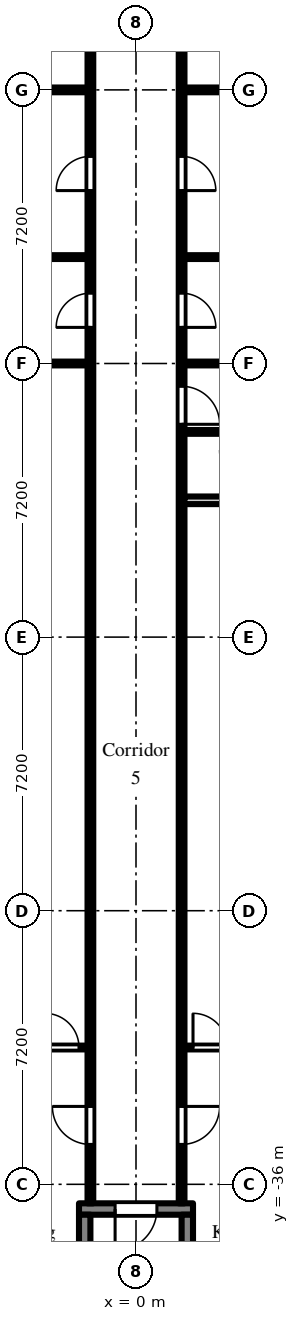
"""IFC4 building model, lengths in metres.
Left out: names, types, materials, properties, quantities, classifications, styles, units other than length and angle.
Written with IfcOpenShell. Run it as: python <this file> out.ifc"""

import sys

from ifc_helpers import new_model, si_unit, direction, frame, frame_2d, origin, place, context, subcontext, project, spatial, rectangle, extrude, element, fill, save


model = new_model("IFC4")
c1 = context("Model", 3, precision=1e-05, world=origin(), true_north=direction((0.0, 1.0)))
c2 = subcontext(c1, "Body", "Model", "MODEL_VIEW")
j1 = project(units=[si_unit("LENGTHUNIT", "METRE"), si_unit("PLANEANGLEUNIT", "RADIAN")], contexts=[c1])
p1 = place(None, origin())
s1 = spatial("IfcSite", under=j1, at=p1, CompositionType="ELEMENT")
p2 = place(p1, origin())
s2 = spatial("IfcBuilding", under=s1, at=p2, CompositionType="ELEMENT")
p3 = place(p2, frame((0.0, 0.0, 69.9)))
s3 = spatial("IfcBuildingStorey", under=s2, at=p3, CompositionType="ELEMENT", Elevation=69.9)
p4 = place(p3, frame((-1.5, -36.65, 0.0), z_axis=(0.0, 0.0, 1.0), x_axis=(1.0, 0.0, 0.0)))
e1 = element("IfcWall", 1, at=p4, inside=s3, PredefinedType="SHEAR", context=c2, shape_type="SweptSolid", body=[
    extrude(rectangle(XDim=3.0, YDim=0.3, at=frame_2d((1.5, 0.0))), origin(), (0.0, 0.0, 1.0), 2.575),
])
p5 = place(p4, frame((0.95, 0.0, 0.0)))
e2 = element("IfcOpeningElement", 2, at=p5, cuts=e1, PredefinedType="OPENING", context=c2, shape_type="SweptSolid", body=[
    extrude(rectangle(XDim=1.1, YDim=2.1, at=frame_2d((0.55, 1.05))), frame((0.0, 0.16, 0.0), z_axis=(0.0, -1.0, 0.0), x_axis=(1.0, 0.0, 0.0)), (0.0, 0.0, 1.0), 0.32),
])
for number, where, z_axis, x_axis in (
    (3, (-1.35, -36.8, 0.0), (0.0, 0.0, 1.0), (0.0, -1.0, 0.0)),
    (4, (1.35, -36.8, 0.0), (0.0, 0.0, 1.0), (0.0, -1.0, 0.0)),
):
    element("IfcWall", number, at=place(p3, frame(where, z_axis=z_axis, x_axis=x_axis)), inside=s3, PredefinedType="SHEAR", context=c2, shape_type="SweptSolid", body=[
        extrude(rectangle(XDim=5.8, YDim=0.3, at=frame_2d((2.9, 0.0))), origin(), (0.0, 0.0, 1.0), 2.575),
    ])
p6 = place(p3, frame((-6.9, -32.4, 0.0), z_axis=(0.0, 0.0, 1.0), x_axis=(1.0, 0.0, 0.0)))
e5 = element("IfcWall", 5, at=p6, inside=s3, PredefinedType="PARTITIONING", context=c2, shape_type="SweptSolid", body=[
    extrude(rectangle(XDim=5.625, YDim=0.1, at=frame_2d((2.812, 0.0))), origin(), (0.0, 0.0, 1.0), 2.575),
])
p7 = place(p6, frame((4.5, 0.0, 0.0)))
e6 = element("IfcOpeningElement", 6, at=p7, cuts=e5, PredefinedType="OPENING", context=c2, shape_type="SweptSolid", body=[
    extrude(rectangle(XDim=0.9, YDim=2.1, at=frame_2d((0.45, 1.05))), frame((0.0, 0.06, 0.0), z_axis=(0.0, -1.0, 0.0), x_axis=(1.0, 0.0, 0.0)), (0.0, 0.0, 1.0), 0.12),
])
p8 = place(p3, frame((-3.9, -11.6, 0.0), z_axis=(0.0, 0.0, 1.0), x_axis=(1.0, 0.0, 0.0)))
e7 = element("IfcWall", 7, at=p8, inside=s3, PredefinedType="PARTITIONING", context=c2, shape_type="SweptSolid", body=[
    extrude(rectangle(XDim=2.625, YDim=0.1, at=frame_2d((1.312, 0.0))), origin(), (0.0, 0.0, 1.0), 2.575),
])
p9 = place(p3, frame((-3.9, -7.2, 0.0), z_axis=(0.0, 0.0, 1.0), x_axis=(1.0, 0.0, 0.0)))
e8 = element("IfcWall", 8, at=p9, inside=s3, PredefinedType="PARTITIONING", context=c2, shape_type="SweptSolid", body=[
    extrude(rectangle(XDim=2.625, YDim=0.125, at=frame_2d((1.312, 0.0))), origin(), (0.0, 0.0, 1.0), 2.575),
])
p10 = place(p3, frame((-2.7, -14.4, 0.0), z_axis=(0.0, 0.0, 1.0), x_axis=(1.0, 0.0, 0.0)))
e9 = element("IfcWall", 9, at=p10, inside=s3, PredefinedType="PARTITIONING", context=c2, shape_type="SweptSolid", body=[
    extrude(rectangle(XDim=1.425, YDim=0.1, at=frame_2d((0.712, 0.0))), origin(), (0.0, 0.0, 1.0), 2.575),
])
p11 = place(p3, frame((-1.2, -36.5, 0.0), z_axis=(0.0, 0.0, 1.0), x_axis=(0.0, 1.0, 0.0)))
e10 = element("IfcWall", 10, at=p11, inside=s3, PredefinedType="PARTITIONING", context=c2, shape_type="SweptSolid", body=[
    extrude(rectangle(XDim=35.225, YDim=0.15, at=frame_2d((17.613, 0.0))), origin(), (0.0, 0.0, 1.0), 2.575),
])
p12 = place(p11, frame((31.85, 0.0, 0.0)))
e11 = element("IfcOpeningElement", 11, at=p12, cuts=e10, PredefinedType="OPENING", context=c2, shape_type="SweptSolid", body=[
    extrude(rectangle(XDim=0.9, YDim=2.1, at=frame_2d((0.45, 1.05))), frame((0.0, 0.085, 0.0), z_axis=(0.0, -1.0, 0.0), x_axis=(1.0, 0.0, 0.0)), (0.0, 0.0, 1.0), 0.17),
])
p13 = place(p11, frame((23.05, 0.0, 0.0)))
e12 = element("IfcOpeningElement", 12, at=p13, cuts=e10, PredefinedType="OPENING", context=c2, shape_type="SweptSolid", body=[
    extrude(rectangle(XDim=0.9, YDim=2.1, at=frame_2d((0.45, 1.05))), frame((0.0, 0.085, 0.0), z_axis=(0.0, -1.0, 0.0), x_axis=(1.0, 0.0, 0.0)), (0.0, 0.0, 1.0), 0.17),
])
p14 = place(p11, frame((26.65, 0.0, 0.0)))
e13 = element("IfcOpeningElement", 13, at=p14, cuts=e10, PredefinedType="OPENING", context=c2, shape_type="SweptSolid", body=[
    extrude(rectangle(XDim=0.9, YDim=2.1, at=frame_2d((0.45, 1.05))), frame((0.0, 0.085, 0.0), z_axis=(0.0, -1.0, 0.0), x_axis=(1.0, 0.0, 0.0)), (0.0, 0.0, 1.0), 0.17),
])
p15 = place(p11, frame((1.55, 0.0, 0.0)))
e14 = element("IfcOpeningElement", 14, at=p15, cuts=e10, PredefinedType="OPENING", context=c2, shape_type="SweptSolid", body=[
    extrude(rectangle(XDim=1.0, YDim=2.1, at=frame_2d((0.5, 1.05))), frame((0.0, 0.085, 0.0), z_axis=(0.0, -1.0, 0.0), x_axis=(1.0, 0.0, 0.0)), (0.0, 0.0, 1.0), 0.17),
])
p16 = place(p3, frame((1.2, -36.5, 0.0), z_axis=(0.0, 0.0, 1.0), x_axis=(0.0, 1.0, 0.0)))
e15 = element("IfcWall", 15, at=p16, inside=s3, PredefinedType="PARTITIONING", context=c2, shape_type="SweptSolid", body=[
    extrude(rectangle(XDim=35.375, YDim=0.15, at=frame_2d((17.688, 0.0))), origin(), (0.0, 0.0, 1.0), 2.575),
])
p17 = place(p16, frame((31.85, 0.0, 0.0)))
e16 = element("IfcOpeningElement", 16, at=p17, cuts=e15, PredefinedType="OPENING", context=c2, shape_type="SweptSolid", body=[
    extrude(rectangle(XDim=0.9, YDim=2.1, at=frame_2d((0.45, 1.05))), frame((0.0, 0.085, 0.0), z_axis=(0.0, -1.0, 0.0), x_axis=(1.0, 0.0, 0.0)), (0.0, 0.0, 1.0), 0.17),
])
p18 = place(p16, frame((23.05, 0.0, 0.0)))
e17 = element("IfcOpeningElement", 17, at=p18, cuts=e15, PredefinedType="OPENING", context=c2, shape_type="SweptSolid", body=[
    extrude(rectangle(XDim=0.9, YDim=2.1, at=frame_2d((0.45, 1.05))), frame((0.0, 0.085, 0.0), z_axis=(0.0, -1.0, 0.0), x_axis=(1.0, 0.0, 0.0)), (0.0, 0.0, 1.0), 0.17),
])
p19 = place(p16, frame((26.65, 0.0, 0.0)))
e18 = element("IfcOpeningElement", 18, at=p19, cuts=e15, PredefinedType="OPENING", context=c2, shape_type="SweptSolid", body=[
    extrude(rectangle(XDim=0.9, YDim=2.1, at=frame_2d((0.45, 1.05))), frame((0.0, 0.085, 0.0), z_axis=(0.0, -1.0, 0.0), x_axis=(1.0, 0.0, 0.0)), (0.0, 0.0, 1.0), 0.17),
])
p20 = place(p16, frame((20.5, 0.0, 0.0)))
e19 = element("IfcOpeningElement", 19, at=p20, cuts=e15, PredefinedType="OPENING", context=c2, shape_type="SweptSolid", body=[
    extrude(rectangle(XDim=1.0, YDim=2.1, at=frame_2d((0.5, 1.05))), frame((0.0, 0.085, 0.0), z_axis=(0.0, -1.0, 0.0), x_axis=(1.0, 0.0, 0.0)), (0.0, 0.0, 1.0), 0.17),
])
p21 = place(p16, frame((1.55, 0.0, 0.0)))
e20 = element("IfcOpeningElement", 20, at=p21, cuts=e15, PredefinedType="OPENING", context=c2, shape_type="SweptSolid", body=[
    extrude(rectangle(XDim=1.0, YDim=2.1, at=frame_2d((0.5, 1.05))), frame((0.0, 0.085, 0.0), z_axis=(0.0, -1.0, 0.0), x_axis=(1.0, 0.0, 0.0)), (0.0, 0.0, 1.0), 0.17),
])
p22 = place(p3, frame((1.275, -32.4, 0.0), z_axis=(0.0, 0.0, 1.0), x_axis=(1.0, 0.0, 0.0)))
e21 = element("IfcWall", 21, at=p22, inside=s3, PredefinedType="PARTITIONING", context=c2, shape_type="SweptSolid", body=[
    extrude(rectangle(XDim=5.625, YDim=0.1, at=frame_2d((2.812, 0.0))), origin(), (0.0, 0.0, 1.0), 2.575),
])
p23 = place(p22, frame((0.225, 0.0, 0.0)))
e22 = element("IfcOpeningElement", 22, at=p23, cuts=e21, PredefinedType="OPENING", context=c2, shape_type="SweptSolid", body=[
    extrude(rectangle(XDim=0.9, YDim=2.1, at=frame_2d((0.45, 1.05))), frame((0.0, 0.06, 0.0), z_axis=(0.0, -1.0, 0.0), x_axis=(1.0, 0.0, 0.0)), (0.0, 0.0, 1.0), 0.12),
])
p24 = place(p3, frame((1.275, -18.0, 0.0), z_axis=(0.0, 0.0, 1.0), x_axis=(1.0, 0.0, 0.0)))
e23 = element("IfcWall", 23, at=p24, inside=s3, PredefinedType="PARTITIONING", context=c2, shape_type="SweptSolid", body=[
    extrude(rectangle(XDim=1.475, YDim=0.2, at=frame_2d((0.738, 0.0))), origin(), (0.0, 0.0, 1.0), 2.575),
])
p25 = place(p3, frame((1.275, -16.2, 0.0), z_axis=(0.0, 0.0, 1.0), x_axis=(1.0, 0.0, 0.0)))
e24 = element("IfcWall", 24, at=p25, inside=s3, PredefinedType="PARTITIONING", context=c2, shape_type="SweptSolid", body=[
    extrude(rectangle(XDim=1.775, YDim=0.1, at=frame_2d((0.888, 0.0))), origin(), (0.0, 0.0, 1.0), 2.575),
])
for number, where, z_axis, x_axis in (
    (25, (1.275, -14.4, 0.0), (0.0, 0.0, 1.0), (1.0, 0.0, 0.0)),
    (26, (1.275, -11.6, 0.0), (0.0, 0.0, 1.0), (1.0, 0.0, 0.0)),
):
    element("IfcWall", number, at=place(p3, frame(where, z_axis=z_axis, x_axis=x_axis)), inside=s3, PredefinedType="PARTITIONING", context=c2, shape_type="SweptSolid", body=[
        extrude(rectangle(XDim=2.625, YDim=0.1, at=frame_2d((1.312, 0.0))), origin(), (0.0, 0.0, 1.0), 2.575),
    ])
p26 = place(p3, frame((1.275, -7.2, 0.0), z_axis=(0.0, 0.0, 1.0), x_axis=(1.0, 0.0, 0.0)))
e27 = element("IfcWall", 27, at=p26, inside=s3, PredefinedType="PARTITIONING", context=c2, shape_type="SweptSolid", body=[
    extrude(rectangle(XDim=2.625, YDim=0.125, at=frame_2d((1.312, 0.0))), origin(), (0.0, 0.0, 1.0), 2.575),
])
p27 = place(p5, frame((1.1, 0.0, 0.0), z_axis=(0.0, 0.0, 1.0), x_axis=(-1.0, 0.0, 0.0)))
e28 = element("IfcDoor", 28, at=p27, inside=s3, OperationType="SINGLE_SWING_RIGHT", PredefinedType="DOOR", context=c2, shape_type="SweptSolid", body=[
    extrude(rectangle(XDim=1.1, YDim=2.1, at=frame_2d((0.55, 1.05))), frame((0.0, 0.025, 0.0), z_axis=(0.0, -1.0, 0.0), x_axis=(1.0, 0.0, 0.0)), (0.0, 0.0, 1.0), 0.05),
])
fill(e2, e28)
p28 = place(p18, frame((0.9, 0.0, 0.0), z_axis=(0.0, 0.0, 1.0), x_axis=(-1.0, 0.0, 0.0)))
e29 = element("IfcDoor", 29, at=p28, inside=s3, OperationType="SINGLE_SWING_RIGHT", PredefinedType="DOOR", context=c2, shape_type="SweptSolid", body=[
    extrude(rectangle(XDim=0.9, YDim=2.1, at=frame_2d((0.45, 1.05))), frame((0.0, 0.025, 0.0), z_axis=(0.0, -1.0, 0.0), x_axis=(1.0, 0.0, 0.0)), (0.0, 0.0, 1.0), 0.05),
])
fill(e17, e29)
p29 = place(p19, frame((0.9, 0.0, 0.0), z_axis=(0.0, 0.0, 1.0), x_axis=(-1.0, 0.0, 0.0)))
e30 = element("IfcDoor", 30, at=p29, inside=s3, OperationType="SINGLE_SWING_RIGHT", PredefinedType="DOOR", context=c2, shape_type="SweptSolid", body=[
    extrude(rectangle(XDim=0.9, YDim=2.1, at=frame_2d((0.45, 1.05))), frame((0.0, 0.025, 0.0), z_axis=(0.0, -1.0, 0.0), x_axis=(1.0, 0.0, 0.0)), (0.0, 0.0, 1.0), 0.05),
])
fill(e18, e30)
p30 = place(p20, frame((1.0, 0.0, 0.0), z_axis=(0.0, 0.0, 1.0), x_axis=(-1.0, 0.0, 0.0)))
e31 = element("IfcDoor", 31, at=p30, inside=s3, OperationType="SINGLE_SWING_RIGHT", PredefinedType="DOOR", context=c2, shape_type="SweptSolid", body=[
    extrude(rectangle(XDim=1.0, YDim=2.1, at=frame_2d((0.5, 1.05))), frame((0.0, 0.025, 0.0), z_axis=(0.0, -1.0, 0.0), x_axis=(1.0, 0.0, 0.0)), (0.0, 0.0, 1.0), 0.05),
])
fill(e19, e31)
p31 = place(p21, frame((1.0, 0.0, 0.0), z_axis=(0.0, 0.0, 1.0), x_axis=(-1.0, 0.0, 0.0)))
e32 = element("IfcDoor", 32, at=p31, inside=s3, OperationType="SINGLE_SWING_LEFT", PredefinedType="DOOR", context=c2, shape_type="SweptSolid", body=[
    extrude(rectangle(XDim=1.0, YDim=2.1, at=frame_2d((0.5, 1.05))), frame((0.0, 0.025, 0.0), z_axis=(0.0, -1.0, 0.0), x_axis=(1.0, 0.0, 0.0)), (0.0, 0.0, 1.0), 0.05),
])
fill(e20, e32)
p32 = place(p23, origin())
e33 = element("IfcDoor", 33, at=p32, inside=s3, OperationType="SINGLE_SWING_LEFT", PredefinedType="DOOR", context=c2, shape_type="SweptSolid", body=[
    extrude(rectangle(XDim=0.9, YDim=2.1, at=frame_2d((0.45, 1.05))), frame((0.0, 0.025, 0.0), z_axis=(0.0, -1.0, 0.0), x_axis=(1.0, 0.0, 0.0)), (0.0, 0.0, 1.0), 0.05),
])
fill(e22, e33)
p33 = place(p13, origin())
e34 = element("IfcDoor", 34, at=p33, inside=s3, OperationType="SINGLE_SWING_LEFT", PredefinedType="DOOR", context=c2, shape_type="SweptSolid", body=[
    extrude(rectangle(XDim=0.9, YDim=2.1, at=frame_2d((0.45, 1.05))), frame((0.0, 0.025, 0.0), z_axis=(0.0, -1.0, 0.0), x_axis=(1.0, 0.0, 0.0)), (0.0, 0.0, 1.0), 0.05),
])
fill(e12, e34)
p34 = place(p14, origin())
e35 = element("IfcDoor", 35, at=p34, inside=s3, OperationType="SINGLE_SWING_LEFT", PredefinedType="DOOR", context=c2, shape_type="SweptSolid", body=[
    extrude(rectangle(XDim=0.9, YDim=2.1, at=frame_2d((0.45, 1.05))), frame((0.0, 0.025, 0.0), z_axis=(0.0, -1.0, 0.0), x_axis=(1.0, 0.0, 0.0)), (0.0, 0.0, 1.0), 0.05),
])
fill(e13, e35)
p35 = place(p15, origin())
e36 = element("IfcDoor", 36, at=p35, inside=s3, OperationType="SINGLE_SWING_RIGHT", PredefinedType="DOOR", context=c2, shape_type="SweptSolid", body=[
    extrude(rectangle(XDim=1.0, YDim=2.1, at=frame_2d((0.5, 1.05))), frame((0.0, 0.025, 0.0), z_axis=(0.0, -1.0, 0.0), x_axis=(1.0, 0.0, 0.0)), (0.0, 0.0, 1.0), 0.05),
])
fill(e14, e36)
p36 = place(p7, origin())
e37 = element("IfcDoor", 37, at=p36, inside=s3, OperationType="SINGLE_SWING_LEFT", PredefinedType="DOOR", context=c2, shape_type="SweptSolid", body=[
    extrude(rectangle(XDim=0.9, YDim=2.1, at=frame_2d((0.45, 1.05))), frame((0.0, 0.025, 0.0), z_axis=(0.0, -1.0, 0.0), x_axis=(1.0, 0.0, 0.0)), (0.0, 0.0, 1.0), 0.05),
])
fill(e6, e37)
save(model, sys.argv[1])
